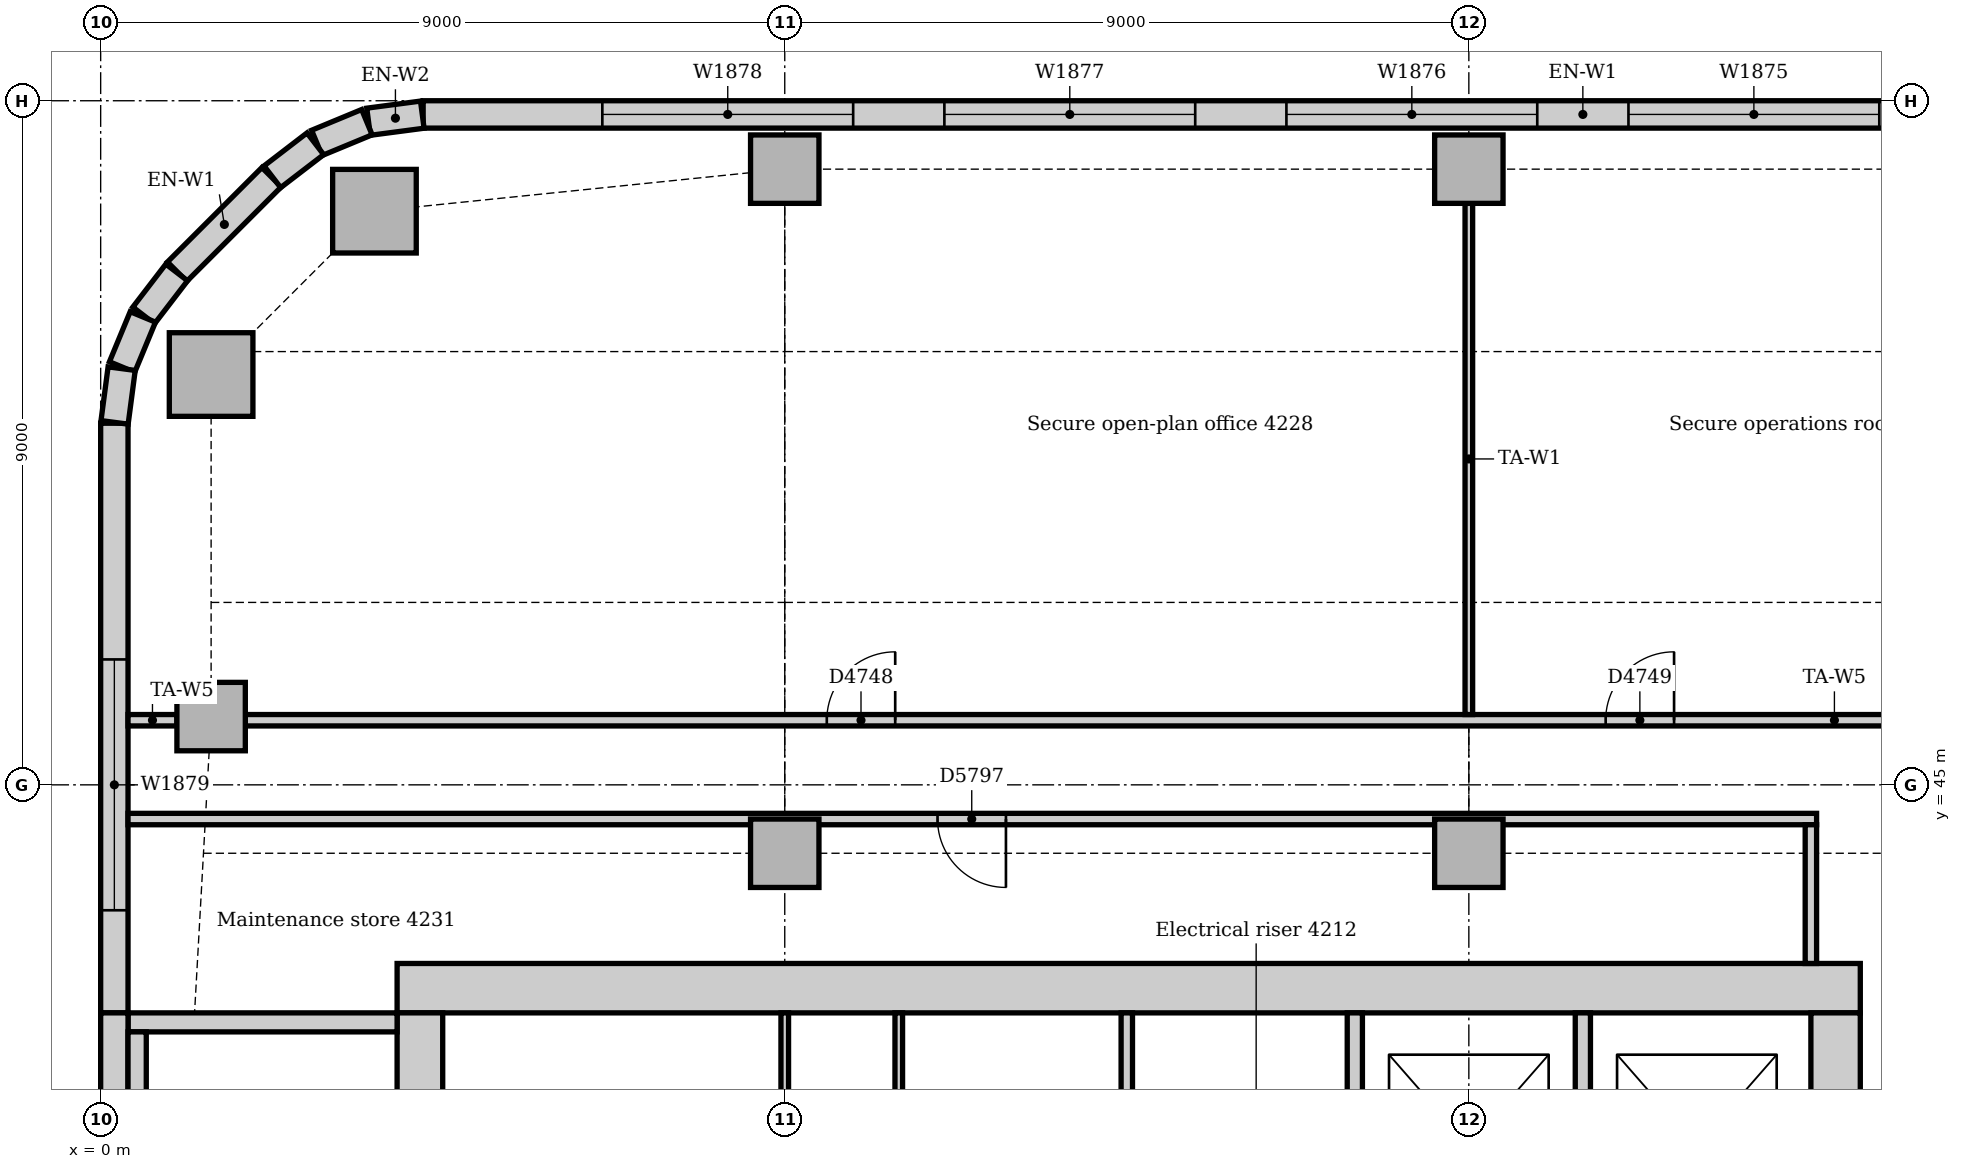
"""IFC4 building model, lengths in metres.
Left out: names, types, materials, properties, quantities, classifications, styles, units other than length and angle.
Written with IfcOpenShell. Run it as: python <this file> out.ifc"""

import sys

from ifc_helpers import new_model, si_unit, direction, frame, frame_2d, origin, origin_2d, place, context, subcontext, project, spatial, rectangle, extrude, element, fill, save


model = new_model("IFC4")
c1 = context("Model", 3, precision=1e-05, world=origin(), true_north=direction((0.0, 1.0)))
c2 = subcontext(c1, "Body", "Model", "MODEL_VIEW")
j1 = project(units=[si_unit("LENGTHUNIT", "METRE"), si_unit("PLANEANGLEUNIT", "RADIAN")], contexts=[c1])
p1 = place(None, origin())
s1 = spatial("IfcSite", under=j1, at=p1, CompositionType="ELEMENT")
p2 = place(p1, origin())
s2 = spatial("IfcBuilding", under=s1, at=p2, CompositionType="ELEMENT")
p3 = place(p2, frame((0.0, 0.0, 177.0)))
s3 = spatial("IfcBuildingStorey", under=s2, at=p3, CompositionType="ELEMENT", Elevation=177.0)
p4 = place(p3, frame((23.15, 42.325, 0.0), z_axis=(0.0, 0.0, 1.0), x_axis=(-1.0, 0.0, 0.0)))
e1 = element("IfcWall", 1, at=p4, inside=s3, PredefinedType="SOLIDWALL", context=c2, shape_type="SweptSolid", body=[
    extrude(rectangle(XDim=19.25, YDim=0.65, at=frame_2d((9.625, 0.0))), origin(), (0.0, 0.0, 1.0), 4.0),
])
p5 = place(p3, frame((22.825, 31.5, 0.0), z_axis=(0.0, 0.0, 1.0), x_axis=(0.0, 1.0, 0.0)))
e2 = element("IfcWall", 2, at=p5, inside=s3, PredefinedType="SOLIDWALL", context=c2, shape_type="SweptSolid", body=[
    extrude(rectangle(XDim=10.5, YDim=0.65, at=frame_2d((5.25, 0.0))), origin(), (0.0, 0.0, 1.0), 4.0),
])
p6 = place(p5, frame((3.15, 0.0, 0.0)))
e3 = element("IfcOpeningElement", 3, at=p6, cuts=e2, PredefinedType="OPENING", context=c2, shape_type="SweptSolid", body=[
    extrude(rectangle(XDim=1.0, YDim=2.1, at=frame_2d((0.5, 1.05))), frame((0.0, 0.335, 0.0), z_axis=(0.0, -1.0, 0.0), x_axis=(1.0, 0.0, 0.0)), (0.0, 0.0, 1.0), 0.67),
])
p7 = place(p5, frame((5.2, 0.0, 0.0)))
e4 = element("IfcOpeningElement", 4, at=p7, cuts=e2, PredefinedType="OPENING", context=c2, shape_type="SweptSolid", body=[
    extrude(rectangle(XDim=1.0, YDim=2.1, at=frame_2d((0.5, 1.05))), frame((0.0, 0.335, 0.0), z_axis=(0.0, -1.0, 0.0), x_axis=(1.0, 0.0, 0.0)), (0.0, 0.0, 1.0), 0.67),
])
p8 = place(p3, frame((4.2, 42.0, 0.0), z_axis=(0.0, 0.0, 1.0), x_axis=(0.0, -1.0, 0.0)))
e5 = element("IfcWall", 5, at=p8, inside=s3, PredefinedType="SOLIDWALL", context=c2, shape_type="SweptSolid", body=[
    extrude(rectangle(XDim=10.5, YDim=0.6, at=frame_2d((5.25, 0.0))), origin(), (0.0, 0.0, 1.0), 4.0),
])
p9 = place(p8, frame((5.3, 0.0, 0.0)))
e6 = element("IfcOpeningElement", 6, at=p9, cuts=e5, PredefinedType="OPENING", context=c2, shape_type="SweptSolid", body=[
    extrude(rectangle(XDim=1.0, YDim=2.1, at=frame_2d((0.5, 1.05))), frame((0.0, 0.31, 0.0), z_axis=(0.0, -1.0, 0.0), x_axis=(1.0, 0.0, 0.0)), (0.0, 0.0, 1.0), 0.62),
])
p10 = place(p3, frame((3.9, 41.875, 0.0), z_axis=(0.0, 0.0, 1.0), x_axis=(-1.0, 0.0, 0.0)))
e7 = element("IfcWall", 7, at=p10, inside=s3, PredefinedType="SOLIDWALL", context=c2, shape_type="SweptSolid", body=[
    extrude(rectangle(XDim=3.54, YDim=0.25, at=frame_2d((1.77, 0.0))), origin(), (0.0, 0.0, 1.0), 4.0),
])
for number, where, z_axis, x_axis in (
    (8, (3.602, 52.547, 0.0), (0.0, 0.0, 1.0), (1.0, 0.0, 0.0)),
    (9, (1.453, 50.398, 0.0), (0.0, 0.0, 1.0), (1.0, 0.0, 0.0)),
):
    element("IfcColumn", number, at=place(p3, frame(where, z_axis=z_axis, x_axis=x_axis)), inside=s3, PredefinedType="COLUMN", context=c2, shape_type="SweptSolid", body=[
        extrude(rectangle(XDim=1.1, YDim=1.1, at=origin_2d()), origin(), (0.0, 0.0, 1.0), 3.85),
    ])
for number, where, z_axis, x_axis in (
    (10, (9.0, 53.1, 0.0), (0.0, 0.0, 1.0), (1.0, 0.0, 0.0)),
    (11, (18.0, 53.1, 0.0), (0.0, 0.0, 1.0), (1.0, 0.0, 0.0)),
    (12, (1.453, 45.898, 0.0), (0.0, 0.0, 1.0), (1.0, 0.0, 0.0)),
    (13, (9.0, 44.1, 0.0), (0.0, 0.0, 1.0), (1.0, 0.0, 0.0)),
    (14, (18.0, 44.1, 0.0), (0.0, 0.0, 1.0), (1.0, 0.0, 0.0)),
):
    element("IfcColumn", number, at=place(p3, frame(where, z_axis=z_axis, x_axis=x_axis)), inside=s3, PredefinedType="COLUMN", context=c2, shape_type="SweptSolid", body=[
        extrude(rectangle(XDim=0.9, YDim=0.9, at=origin_2d()), origin(), (0.0, 0.0, 1.0), 3.85),
    ])
p11 = place(p3, frame((34.757, 53.82, 0.0), z_axis=(0.0, 0.0, 1.0), x_axis=(-1.0, 0.0, 0.0)))
e15 = element("IfcWall", 15, at=p11, inside=s3, PredefinedType="STANDARD", context=c2, shape_type="SweptSolid", body=[
    extrude(rectangle(XDim=30.515, YDim=0.36, at=frame_2d((15.257, 0.0))), origin(), (0.0, 0.0, 1.0), 3.85),
])
p12 = place(p11, frame((3.457, 0.0, 0.9)))
e16 = element("IfcOpeningElement", 16, at=p12, cuts=e15, PredefinedType="OPENING", context=c2, shape_type="SweptSolid", body=[
    extrude(rectangle(XDim=1.8, YDim=1.6, at=frame_2d((0.9, 0.8))), frame((0.0, 0.19, 0.0), z_axis=(0.0, -1.0, 0.0), x_axis=(1.0, 0.0, 0.0)), (0.0, 0.0, 1.0), 0.38),
])
p13 = place(p11, frame((6.857, 0.0, 0.9)))
e17 = element("IfcOpeningElement", 17, at=p13, cuts=e15, PredefinedType="OPENING", context=c2, shape_type="SweptSolid", body=[
    extrude(rectangle(XDim=3.3, YDim=1.6, at=frame_2d((1.65, 0.8))), frame((0.0, 0.19, 0.0), z_axis=(0.0, -1.0, 0.0), x_axis=(1.0, 0.0, 0.0)), (0.0, 0.0, 1.0), 0.38),
])
p14 = place(p11, frame((11.357, 0.0, 0.9)))
e18 = element("IfcOpeningElement", 18, at=p14, cuts=e15, PredefinedType="OPENING", context=c2, shape_type="SweptSolid", body=[
    extrude(rectangle(XDim=3.3, YDim=1.6, at=frame_2d((1.65, 0.8))), frame((0.0, 0.19, 0.0), z_axis=(0.0, -1.0, 0.0), x_axis=(1.0, 0.0, 0.0)), (0.0, 0.0, 1.0), 0.38),
])
p15 = place(p11, frame((15.857, 0.0, 0.9)))
e19 = element("IfcOpeningElement", 19, at=p15, cuts=e15, PredefinedType="OPENING", context=c2, shape_type="SweptSolid", body=[
    extrude(rectangle(XDim=3.3, YDim=1.6, at=frame_2d((1.65, 0.8))), frame((0.0, 0.19, 0.0), z_axis=(0.0, -1.0, 0.0), x_axis=(1.0, 0.0, 0.0)), (0.0, 0.0, 1.0), 0.38),
])
p16 = place(p11, frame((20.357, 0.0, 0.9)))
e20 = element("IfcOpeningElement", 20, at=p16, cuts=e15, PredefinedType="OPENING", context=c2, shape_type="SweptSolid", body=[
    extrude(rectangle(XDim=3.3, YDim=1.6, at=frame_2d((1.65, 0.8))), frame((0.0, 0.19, 0.0), z_axis=(0.0, -1.0, 0.0), x_axis=(1.0, 0.0, 0.0)), (0.0, 0.0, 1.0), 0.38),
])
p17 = place(p11, frame((24.857, 0.0, 0.9)))
e21 = element("IfcOpeningElement", 21, at=p17, cuts=e15, PredefinedType="OPENING", context=c2, shape_type="SweptSolid", body=[
    extrude(rectangle(XDim=3.3, YDim=1.6, at=frame_2d((1.65, 0.8))), frame((0.0, 0.19, 0.0), z_axis=(0.0, -1.0, 0.0), x_axis=(1.0, 0.0, 0.0)), (0.0, 0.0, 1.0), 0.38),
])
p18 = place(p3, frame((2.249, 52.994, 0.0), z_axis=(0.0, 0.0, 1.0), x_axis=(-0.707106781187, -0.707106781187, 0.0)))
e22 = element("IfcWall", 22, at=p18, inside=s3, PredefinedType="STANDARD", context=c2, shape_type="SweptSolid", body=[
    extrude(rectangle(XDim=1.757, YDim=0.36, at=frame_2d((0.879, 0.0))), origin(), (0.0, 0.0, 1.0), 3.85),
])
p19 = place(p3, frame((0.18, 49.757, 0.0), z_axis=(0.0, 0.0, 1.0), x_axis=(0.0, -1.0, 0.0)))
e23 = element("IfcWall", 23, at=p19, inside=s3, PredefinedType="STANDARD", context=c2, shape_type="SweptSolid", body=[
    extrude(rectangle(XDim=7.757, YDim=0.36, at=frame_2d((3.879, 0.0))), origin(), (0.0, 0.0, 1.0), 3.85),
])
p20 = place(p19, frame((3.107, 0.0, 0.9)))
e24 = element("IfcOpeningElement", 24, at=p20, cuts=e23, PredefinedType="OPENING", context=c2, shape_type="SweptSolid", body=[
    extrude(rectangle(XDim=3.3, YDim=1.6, at=frame_2d((1.65, 0.8))), frame((0.0, 0.19, 0.0), z_axis=(0.0, -1.0, 0.0), x_axis=(1.0, 0.0, 0.0)), (0.0, 0.0, 1.0), 0.38),
])
p21 = place(p3, frame((0.18, 42.0, 0.0), z_axis=(0.0, 0.0, 1.0), x_axis=(0.0, -1.0, 0.0)))
e25 = element("IfcWall", 25, at=p21, inside=s3, PredefinedType="STANDARD", context=c2, shape_type="SweptSolid", body=[
    extrude(rectangle(XDim=6.75, YDim=0.36, at=frame_2d((3.375, 0.0))), origin(), (0.0, 0.0, 1.0), 3.85),
])
for number, where, z_axis, x_axis in (
    (26, (4.231, 53.817, 0.0), (0.0, 0.0, 1.0), (-0.991, -0.131, 0.0)),
    (27, (3.503, 53.718, 0.0), (0.0, 0.0, 1.0), (-0.924, -0.383, 0.0)),
):
    element("IfcWall", number, at=place(p3, frame(where, z_axis=z_axis, x_axis=x_axis)), inside=s3, PredefinedType="STANDARD", context=c2, shape_type="SweptSolid", body=[
        extrude(rectangle(XDim=0.713, YDim=0.36, at=frame_2d((0.356, 0.0))), origin(), (0.0, 0.0, 1.0), 3.85),
    ])
for number, where, z_axis, x_axis in (
    (28, (2.825, 53.434, 0.0), (0.0, 0.0, 1.0), (-0.793, -0.609, 0.0)),
    (29, (1.0, 51.741, 0.0), (0.0, 0.0, 1.0), (-0.609, -0.793, 0.0)),
):
    element("IfcWall", number, at=place(p3, frame(where, z_axis=z_axis, x_axis=x_axis)), inside=s3, PredefinedType="STANDARD", context=c2, shape_type="SweptSolid", body=[
        extrude(rectangle(XDim=0.713, YDim=0.36, at=frame_2d((0.357, 0.0))), origin(), (0.0, 0.0, 1.0), 3.85),
    ])
for number, where, z_axis, x_axis in (
    (30, (0.555, 51.156, 0.0), (0.0, 0.0, 1.0), (-0.383, -0.924, 0.0)),
    (31, (0.276, 50.476, 0.0), (0.0, 0.0, 1.0), (-0.131, -0.991, 0.0)),
):
    element("IfcWall", number, at=place(p3, frame(where, z_axis=z_axis, x_axis=x_axis)), inside=s3, PredefinedType="STANDARD", context=c2, shape_type="SweptSolid", body=[
        extrude(rectangle(XDim=0.713, YDim=0.36, at=frame_2d((0.356, 0.0))), origin(), (0.0, 0.0, 1.0), 3.85),
    ])
p22 = place(p3, frame((0.48, 40.13, 0.0), z_axis=(0.0, 0.0, 1.0), x_axis=(0.0, 1.0, 0.0)))
e32 = element("IfcWall", 32, at=p22, inside=s3, PredefinedType="STANDARD", context=c2, shape_type="SweptSolid", body=[
    extrude(rectangle(XDim=1.62, YDim=0.24, at=frame_2d((0.81, 0.0))), origin(), (0.0, 0.0, 1.0), 4.0),
])
for number, where, z_axis, x_axis in (
    (33, (16.5, 38.6, 0.0), (0.0, 0.0, 1.0), (0.0, 1.0, 0.0)),
    (34, (19.5, 38.6, 0.0), (0.0, 0.0, 1.0), (0.0, 1.0, 0.0)),
):
    element("IfcWall", number, at=place(p3, frame(where, z_axis=z_axis, x_axis=x_axis)), inside=s3, PredefinedType="PARTITIONING", context=c2, shape_type="SweptSolid", body=[
        extrude(rectangle(XDim=3.4, YDim=0.2, at=frame_2d((1.7, 0.0))), origin(), (0.0, 0.0, 1.0), 3.85),
    ])
p23 = place(p3, frame((1.903, 45.85, 0.0), z_axis=(0.0, 0.0, 1.0), x_axis=(1.0, 0.0, 0.0)))
e35 = element("IfcWall", 35, at=p23, inside=s3, PredefinedType="PARTITIONING", context=c2, shape_type="SweptSolid", body=[
    extrude(rectangle(XDim=41.813, YDim=0.15, at=frame_2d((20.906, 0.0))), origin(), (0.0, 0.0, 1.0), 3.85),
])
p24 = place(p23, frame((7.65, 0.0, 0.0)))
e36 = element("IfcOpeningElement", 36, at=p24, cuts=e35, PredefinedType="OPENING", context=c2, shape_type="SweptSolid", body=[
    extrude(rectangle(XDim=0.9, YDim=2.1, at=frame_2d((0.45, 1.05))), frame((0.0, 0.085, 0.0), z_axis=(0.0, -1.0, 0.0), x_axis=(1.0, 0.0, 0.0)), (0.0, 0.0, 1.0), 0.17),
])
p25 = place(p23, frame((17.897, 0.0, 0.0)))
e37 = element("IfcOpeningElement", 37, at=p25, cuts=e35, PredefinedType="OPENING", context=c2, shape_type="SweptSolid", body=[
    extrude(rectangle(XDim=0.9, YDim=2.1, at=frame_2d((0.45, 1.05))), frame((0.0, 0.085, 0.0), z_axis=(0.0, -1.0, 0.0), x_axis=(1.0, 0.0, 0.0)), (0.0, 0.0, 1.0), 0.17),
])
p26 = place(p23, frame((35.197, 0.0, 0.0)))
e38 = element("IfcOpeningElement", 38, at=p26, cuts=e35, PredefinedType="OPENING", context=c2, shape_type="SweptSolid", body=[
    extrude(rectangle(XDim=0.9, YDim=2.1, at=frame_2d((0.45, 1.05))), frame((0.0, 0.085, 0.0), z_axis=(0.0, -1.0, 0.0), x_axis=(1.0, 0.0, 0.0)), (0.0, 0.0, 1.0), 0.17),
])
p27 = place(p3, frame((0.36, 45.85, 0.0), z_axis=(0.0, 0.0, 1.0), x_axis=(1.0, 0.0, 0.0)))
e39 = element("IfcWall", 39, at=p27, inside=s3, PredefinedType="PARTITIONING", context=c2, shape_type="SweptSolid", body=[
    extrude(rectangle(XDim=0.643, YDim=0.15, at=frame_2d((0.322, 0.0))), origin(), (0.0, 0.0, 1.0), 3.85),
])
p28 = place(p3, frame((0.36, 44.55, 0.0), z_axis=(0.0, 0.0, 1.0), x_axis=(1.0, 0.0, 0.0)))
e40 = element("IfcWall", 40, at=p28, inside=s3, PredefinedType="PARTITIONING", context=c2, shape_type="SweptSolid", body=[
    extrude(rectangle(XDim=22.215, YDim=0.15, at=frame_2d((11.107, 0.0))), origin(), (0.0, 0.0, 1.0), 3.85),
])
p29 = place(p28, frame((10.65, 0.0, 0.0)))
e41 = element("IfcOpeningElement", 41, at=p29, cuts=e40, PredefinedType="OPENING", context=c2, shape_type="SweptSolid", body=[
    extrude(rectangle(XDim=0.9, YDim=2.1, at=frame_2d((0.45, 1.05))), frame((0.0, 0.085, 0.0), z_axis=(0.0, -1.0, 0.0), x_axis=(1.0, 0.0, 0.0)), (0.0, 0.0, 1.0), 0.17),
])
p30 = place(p3, frame((22.5, 42.65, 0.0), z_axis=(0.0, 0.0, 1.0), x_axis=(0.0, 1.0, 0.0)))
e42 = element("IfcWall", 42, at=p30, inside=s3, PredefinedType="PARTITIONING", context=c2, shape_type="SweptSolid", body=[
    extrude(rectangle(XDim=1.825, YDim=0.15, at=frame_2d((0.912, 0.0))), origin(), (0.0, 0.0, 1.0), 3.85),
])
p31 = place(p3, frame((13.5, 38.575, 0.0), z_axis=(0.0, 0.0, 1.0), x_axis=(0.0, 1.0, 0.0)))
e43 = element("IfcWall", 43, at=p31, inside=s3, PredefinedType="PARTITIONING", context=c2, shape_type="SweptSolid", body=[
    extrude(rectangle(XDim=3.425, YDim=0.15, at=frame_2d((1.712, 0.0))), origin(), (0.0, 0.0, 1.0), 3.85),
])
p32 = place(p3, frame((18.0, 45.925, 0.0), z_axis=(0.0, 0.0, 1.0), x_axis=(0.0, 1.0, 0.0)))
e44 = element("IfcWall", 44, at=p32, inside=s3, PredefinedType="PARTITIONING", context=c2, shape_type="SweptSolid", body=[
    extrude(rectangle(XDim=6.725, YDim=0.1, at=frame_2d((3.362, 0.0))), origin(), (0.0, 0.0, 1.0), 3.362),
])
for number, where, z_axis, x_axis in (
    (45, (9.0, 38.575, 0.0), (0.0, 0.0, 1.0), (0.0, 1.0, 0.0)),
    (46, (10.5, 38.575, 0.0), (0.0, 0.0, 1.0), (0.0, 1.0, 0.0)),
):
    element("IfcWall", number, at=place(p3, frame(where, z_axis=z_axis, x_axis=x_axis)), inside=s3, PredefinedType="PARTITIONING", context=c2, shape_type="SweptSolid", body=[
        extrude(rectangle(XDim=3.425, YDim=0.1, at=frame_2d((1.712, 0.0))), origin(), (0.0, 0.0, 1.0), 3.85),
    ])
p33 = place(p14, origin())
e47 = element("IfcWindow", 47, at=p33, inside=s3, PartitioningType="SINGLE_PANEL", PredefinedType="WINDOW", context=c2, shape_type="SweptSolid", body=[
    extrude(rectangle(XDim=3.3, YDim=1.6, at=frame_2d((1.65, 0.8))), frame((0.0, 0.13, 0.0), z_axis=(0.0, -1.0, 0.0), x_axis=(1.0, 0.0, 0.0)), (0.0, 0.0, 1.0), 0.06),
])
fill(e18, e47)
p34 = place(p15, origin())
e48 = element("IfcWindow", 48, at=p34, inside=s3, PartitioningType="SINGLE_PANEL", PredefinedType="WINDOW", context=c2, shape_type="SweptSolid", body=[
    extrude(rectangle(XDim=3.3, YDim=1.6, at=frame_2d((1.65, 0.8))), frame((0.0, 0.13, 0.0), z_axis=(0.0, -1.0, 0.0), x_axis=(1.0, 0.0, 0.0)), (0.0, 0.0, 1.0), 0.06),
])
fill(e19, e48)
p35 = place(p16, origin())
e49 = element("IfcWindow", 49, at=p35, inside=s3, PartitioningType="SINGLE_PANEL", PredefinedType="WINDOW", context=c2, shape_type="SweptSolid", body=[
    extrude(rectangle(XDim=3.3, YDim=1.6, at=frame_2d((1.65, 0.8))), frame((0.0, 0.13, 0.0), z_axis=(0.0, -1.0, 0.0), x_axis=(1.0, 0.0, 0.0)), (0.0, 0.0, 1.0), 0.06),
])
fill(e20, e49)
p36 = place(p17, origin())
e50 = element("IfcWindow", 50, at=p36, inside=s3, PartitioningType="SINGLE_PANEL", PredefinedType="WINDOW", context=c2, shape_type="SweptSolid", body=[
    extrude(rectangle(XDim=3.3, YDim=1.6, at=frame_2d((1.65, 0.8))), frame((0.0, 0.13, 0.0), z_axis=(0.0, -1.0, 0.0), x_axis=(1.0, 0.0, 0.0)), (0.0, 0.0, 1.0), 0.06),
])
fill(e21, e50)
p37 = place(p20, origin())
e51 = element("IfcWindow", 51, at=p37, inside=s3, PartitioningType="SINGLE_PANEL", PredefinedType="WINDOW", context=c2, shape_type="SweptSolid", body=[
    extrude(rectangle(XDim=3.3, YDim=1.6, at=frame_2d((1.65, 0.8))), frame((0.0, 0.13, 0.0), z_axis=(0.0, -1.0, 0.0), x_axis=(1.0, 0.0, 0.0)), (0.0, 0.0, 1.0), 0.06),
])
fill(e24, e51)
p38 = place(p24, origin())
e52 = element("IfcDoor", 52, at=p38, inside=s3, OperationType="SINGLE_SWING_RIGHT", PredefinedType="DOOR", context=c2, shape_type="SweptSolid", body=[
    extrude(rectangle(XDim=0.9, YDim=2.1, at=frame_2d((0.45, 1.05))), frame((0.0, 0.025, 0.0), z_axis=(0.0, -1.0, 0.0), x_axis=(1.0, 0.0, 0.0)), (0.0, 0.0, 1.0), 0.05),
])
fill(e36, e52)
p39 = place(p25, origin())
e53 = element("IfcDoor", 53, at=p39, inside=s3, OperationType="SINGLE_SWING_RIGHT", PredefinedType="DOOR", context=c2, shape_type="SweptSolid", body=[
    extrude(rectangle(XDim=0.9, YDim=2.1, at=frame_2d((0.45, 1.05))), frame((0.0, 0.025, 0.0), z_axis=(0.0, -1.0, 0.0), x_axis=(1.0, 0.0, 0.0)), (0.0, 0.0, 1.0), 0.05),
])
fill(e37, e53)
p40 = place(p29, frame((0.9, 0.0, 0.0), z_axis=(0.0, 0.0, 1.0), x_axis=(-1.0, 0.0, 0.0)))
e54 = element("IfcDoor", 54, at=p40, inside=s3, OperationType="SINGLE_SWING_LEFT", PredefinedType="DOOR", context=c2, shape_type="SweptSolid", body=[
    extrude(rectangle(XDim=0.9, YDim=2.1, at=frame_2d((0.45, 1.05))), frame((0.0, 0.025, 0.0), z_axis=(0.0, -1.0, 0.0), x_axis=(1.0, 0.0, 0.0)), (0.0, 0.0, 1.0), 0.05),
])
fill(e41, e54)
save(model, sys.argv[1])
